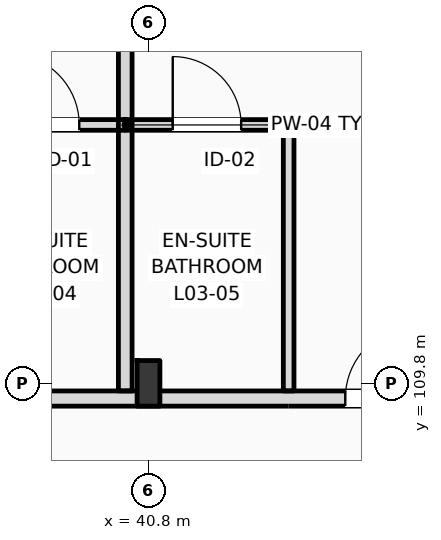
"""IFC4 building model, lengths in metres.
Left out: names, types, materials, properties, quantities, classifications, styles, units other than length and angle.
Written with IfcOpenShell. Run it as: python <this file> out.ifc"""

import sys

from ifc_helpers import new_model, si_unit, direction, frame, frame_2d, origin, origin_2d, place, context, subcontext, project, spatial, rectangle, i_section, extrude, element, fill, save


model = new_model("IFC4")
c1 = context("Model", 3, precision=1e-05, world=origin(), true_north=direction((0.0, 1.0)))
c2 = subcontext(c1, "Body", "Model", "MODEL_VIEW")
j1 = project(units=[si_unit("LENGTHUNIT", "METRE"), si_unit("PLANEANGLEUNIT", "RADIAN")], contexts=[c1])
p1 = place(None, origin())
s1 = spatial("IfcSite", under=j1, at=p1, CompositionType="ELEMENT")
p2 = place(p1, origin())
s2 = spatial("IfcBuilding", under=s1, at=p2, CompositionType="ELEMENT")
p3 = place(p2, frame((0.0, 0.0, 16.2)))
s3 = spatial("IfcBuildingStorey", under=s2, at=p3, CompositionType="ELEMENT", Elevation=16.2)
p4 = place(p3, frame((40.8, 109.8, 0.0), z_axis=(0.0, 0.0, 1.0), x_axis=(1.0, 0.0, 0.0)))
e1 = element("IfcColumn", 1, at=p4, inside=s3, PredefinedType="COLUMN", context=c2, shape_type="SweptSolid", body=[
    extrude(i_section(OverallWidth=0.3, OverallDepth=0.6, WebThickness=0.015, FlangeThickness=0.03, FilletRadius=0.027, at=origin_2d()), origin(), (0.0, 0.0, 1.0), 4.2),
])
p5 = place(p3, frame((10.65, 109.6, 0.0), z_axis=(0.0, 0.0, 1.0), x_axis=(1.0, 0.0, 0.0)))
e2 = element("IfcWall", 2, at=p5, inside=s3, PredefinedType="PARTITIONING", context=c2, shape_type="SweptSolid", body=[
    extrude(rectangle(XDim=109.21, YDim=0.2, at=frame_2d((54.605, 0.0))), origin(), (0.0, 0.0, 1.0), 3.36),
])
p6 = place(p5, frame((15.43, 0.0, 0.0)))
e3 = element("IfcOpeningElement", 3, at=p6, cuts=e2, PredefinedType="OPENING", context=c2, shape_type="SweptSolid", body=[
    extrude(rectangle(XDim=1.02, YDim=2.2, at=frame_2d((0.51, 1.1))), frame((0.0, 0.11, 0.0), z_axis=(0.0, -1.0, 0.0), x_axis=(1.0, 0.0, 0.0)), (0.0, 0.0, 1.0), 0.22),
])
p7 = place(p5, frame((19.537, 0.0, 0.0)))
e4 = element("IfcOpeningElement", 4, at=p7, cuts=e2, PredefinedType="OPENING", context=c2, shape_type="SweptSolid", body=[
    extrude(rectangle(XDim=1.02, YDim=2.2, at=frame_2d((0.51, 1.1))), frame((0.0, 0.11, 0.0), z_axis=(0.0, -1.0, 0.0), x_axis=(1.0, 0.0, 0.0)), (0.0, 0.0, 1.0), 0.22),
])
p8 = place(p5, frame((23.928, 0.0, 0.0)))
e5 = element("IfcOpeningElement", 5, at=p8, cuts=e2, PredefinedType="OPENING", context=c2, shape_type="SweptSolid", body=[
    extrude(rectangle(XDim=1.02, YDim=2.2, at=frame_2d((0.51, 1.1))), frame((0.0, 0.11, 0.0), z_axis=(0.0, -1.0, 0.0), x_axis=(1.0, 0.0, 0.0)), (0.0, 0.0, 1.0), 0.22),
])
p9 = place(p5, frame((26.169, 0.0, 0.0)))
e6 = element("IfcOpeningElement", 6, at=p9, cuts=e2, PredefinedType="OPENING", context=c2, shape_type="SweptSolid", body=[
    extrude(rectangle(XDim=1.02, YDim=2.2, at=frame_2d((0.51, 1.1))), frame((0.0, 0.11, 0.0), z_axis=(0.0, -1.0, 0.0), x_axis=(1.0, 0.0, 0.0)), (0.0, 0.0, 1.0), 0.22),
])
p10 = place(p5, frame((32.739, 0.0, 0.0)))
e7 = element("IfcOpeningElement", 7, at=p10, cuts=e2, PredefinedType="OPENING", context=c2, shape_type="SweptSolid", body=[
    extrude(rectangle(XDim=0.96, YDim=2.2, at=frame_2d((0.48, 1.1))), frame((0.0, 0.11, 0.0), z_axis=(0.0, -1.0, 0.0), x_axis=(1.0, 0.0, 0.0)), (0.0, 0.0, 1.0), 0.22),
])
p11 = place(p5, frame((34.98, 0.0, 0.0)))
e8 = element("IfcOpeningElement", 8, at=p11, cuts=e2, PredefinedType="OPENING", context=c2, shape_type="SweptSolid", body=[
    extrude(rectangle(XDim=0.96, YDim=2.2, at=frame_2d((0.48, 1.1))), frame((0.0, 0.11, 0.0), z_axis=(0.0, -1.0, 0.0), x_axis=(1.0, 0.0, 0.0)), (0.0, 0.0, 1.0), 0.22),
])
p12 = place(p5, frame((41.521, 0.0, 0.0)))
e9 = element("IfcOpeningElement", 9, at=p12, cuts=e2, PredefinedType="OPENING", context=c2, shape_type="SweptSolid", body=[
    extrude(rectangle(XDim=0.96, YDim=2.2, at=frame_2d((0.48, 1.1))), frame((0.0, 0.11, 0.0), z_axis=(0.0, -1.0, 0.0), x_axis=(1.0, 0.0, 0.0)), (0.0, 0.0, 1.0), 0.22),
])
p13 = place(p5, frame((43.512, 0.0, 0.0)))
e10 = element("IfcOpeningElement", 10, at=p13, cuts=e2, PredefinedType="OPENING", context=c2, shape_type="SweptSolid", body=[
    extrude(rectangle(XDim=0.96, YDim=2.2, at=frame_2d((0.48, 1.1))), frame((0.0, 0.11, 0.0), z_axis=(0.0, -1.0, 0.0), x_axis=(1.0, 0.0, 0.0)), (0.0, 0.0, 1.0), 0.22),
])
p14 = place(p5, frame((50.303, 0.0, 0.0)))
e11 = element("IfcOpeningElement", 11, at=p14, cuts=e2, PredefinedType="OPENING", context=c2, shape_type="SweptSolid", body=[
    extrude(rectangle(XDim=0.96, YDim=2.2, at=frame_2d((0.48, 1.1))), frame((0.0, 0.11, 0.0), z_axis=(0.0, -1.0, 0.0), x_axis=(1.0, 0.0, 0.0)), (0.0, 0.0, 1.0), 0.22),
])
p15 = place(p5, frame((54.944, 0.0, 0.0)))
e12 = element("IfcOpeningElement", 12, at=p15, cuts=e2, PredefinedType="OPENING", context=c2, shape_type="SweptSolid", body=[
    extrude(rectangle(XDim=0.96, YDim=2.2, at=frame_2d((0.48, 1.1))), frame((0.0, 0.11, 0.0), z_axis=(0.0, -1.0, 0.0), x_axis=(1.0, 0.0, 0.0)), (0.0, 0.0, 1.0), 0.22),
])
p16 = place(p5, frame((59.085, 0.0, 0.0)))
e13 = element("IfcOpeningElement", 13, at=p16, cuts=e2, PredefinedType="OPENING", context=c2, shape_type="SweptSolid", body=[
    extrude(rectangle(XDim=0.96, YDim=2.2, at=frame_2d((0.48, 1.1))), frame((0.0, 0.11, 0.0), z_axis=(0.0, -1.0, 0.0), x_axis=(1.0, 0.0, 0.0)), (0.0, 0.0, 1.0), 0.22),
])
p17 = place(p5, frame((63.476, 0.0, 0.0)))
e14 = element("IfcOpeningElement", 14, at=p17, cuts=e2, PredefinedType="OPENING", context=c2, shape_type="SweptSolid", body=[
    extrude(rectangle(XDim=0.96, YDim=2.2, at=frame_2d((0.48, 1.1))), frame((0.0, 0.11, 0.0), z_axis=(0.0, -1.0, 0.0), x_axis=(1.0, 0.0, 0.0)), (0.0, 0.0, 1.0), 0.22),
])
p18 = place(p5, frame((65.716, 0.0, 0.0)))
e15 = element("IfcOpeningElement", 15, at=p18, cuts=e2, PredefinedType="OPENING", context=c2, shape_type="SweptSolid", body=[
    extrude(rectangle(XDim=0.96, YDim=2.2, at=frame_2d((0.48, 1.1))), frame((0.0, 0.11, 0.0), z_axis=(0.0, -1.0, 0.0), x_axis=(1.0, 0.0, 0.0)), (0.0, 0.0, 1.0), 0.22),
])
p19 = place(p5, frame((72.257, 0.0, 0.0)))
e16 = element("IfcOpeningElement", 16, at=p19, cuts=e2, PredefinedType="OPENING", context=c2, shape_type="SweptSolid", body=[
    extrude(rectangle(XDim=0.96, YDim=2.2, at=frame_2d((0.48, 1.1))), frame((0.0, 0.11, 0.0), z_axis=(0.0, -1.0, 0.0), x_axis=(1.0, 0.0, 0.0)), (0.0, 0.0, 1.0), 0.22),
])
p20 = place(p5, frame((74.498, 0.0, 0.0)))
e17 = element("IfcOpeningElement", 17, at=p20, cuts=e2, PredefinedType="OPENING", context=c2, shape_type="SweptSolid", body=[
    extrude(rectangle(XDim=0.96, YDim=2.2, at=frame_2d((0.48, 1.1))), frame((0.0, 0.11, 0.0), z_axis=(0.0, -1.0, 0.0), x_axis=(1.0, 0.0, 0.0)), (0.0, 0.0, 1.0), 0.22),
])
p21 = place(p5, frame((81.039, 0.0, 0.0)))
e18 = element("IfcOpeningElement", 18, at=p21, cuts=e2, PredefinedType="OPENING", context=c2, shape_type="SweptSolid", body=[
    extrude(rectangle(XDim=0.96, YDim=2.2, at=frame_2d((0.48, 1.1))), frame((0.0, 0.11, 0.0), z_axis=(0.0, -1.0, 0.0), x_axis=(1.0, 0.0, 0.0)), (0.0, 0.0, 1.0), 0.22),
])
p22 = place(p5, frame((85.68, 0.0, 0.0)))
e19 = element("IfcOpeningElement", 19, at=p22, cuts=e2, PredefinedType="OPENING", context=c2, shape_type="SweptSolid", body=[
    extrude(rectangle(XDim=0.96, YDim=2.2, at=frame_2d((0.48, 1.1))), frame((0.0, 0.11, 0.0), z_axis=(0.0, -1.0, 0.0), x_axis=(1.0, 0.0, 0.0)), (0.0, 0.0, 1.0), 0.22),
])
p23 = place(p5, frame((89.82, 0.0, 0.0)))
e20 = element("IfcOpeningElement", 20, at=p23, cuts=e2, PredefinedType="OPENING", context=c2, shape_type="SweptSolid", body=[
    extrude(rectangle(XDim=0.96, YDim=2.2, at=frame_2d((0.48, 1.1))), frame((0.0, 0.11, 0.0), z_axis=(0.0, -1.0, 0.0), x_axis=(1.0, 0.0, 0.0)), (0.0, 0.0, 1.0), 0.22),
])
p24 = place(p5, frame((94.211, 0.0, 0.0)))
e21 = element("IfcOpeningElement", 21, at=p24, cuts=e2, PredefinedType="OPENING", context=c2, shape_type="SweptSolid", body=[
    extrude(rectangle(XDim=0.96, YDim=2.2, at=frame_2d((0.48, 1.1))), frame((0.0, 0.11, 0.0), z_axis=(0.0, -1.0, 0.0), x_axis=(1.0, 0.0, 0.0)), (0.0, 0.0, 1.0), 0.22),
])
p25 = place(p5, frame((98.602, 0.0, 0.0)))
e22 = element("IfcOpeningElement", 22, at=p25, cuts=e2, PredefinedType="OPENING", context=c2, shape_type="SweptSolid", body=[
    extrude(rectangle(XDim=0.96, YDim=2.2, at=frame_2d((0.48, 1.1))), frame((0.0, 0.11, 0.0), z_axis=(0.0, -1.0, 0.0), x_axis=(1.0, 0.0, 0.0)), (0.0, 0.0, 1.0), 0.22),
])
p26 = place(p5, frame((102.993, 0.0, 0.0)))
e23 = element("IfcOpeningElement", 23, at=p26, cuts=e2, PredefinedType="OPENING", context=c2, shape_type="SweptSolid", body=[
    extrude(rectangle(XDim=0.96, YDim=2.2, at=frame_2d((0.48, 1.1))), frame((0.0, 0.11, 0.0), z_axis=(0.0, -1.0, 0.0), x_axis=(1.0, 0.0, 0.0)), (0.0, 0.0, 1.0), 0.22),
])
p27 = place(p5, frame((105.269, 0.0, 0.0)))
e24 = element("IfcOpeningElement", 24, at=p27, cuts=e2, PredefinedType="OPENING", context=c2, shape_type="SweptSolid", body=[
    extrude(rectangle(XDim=0.96, YDim=2.2, at=frame_2d((0.48, 1.1))), frame((0.0, 0.11, 0.0), z_axis=(0.0, -1.0, 0.0), x_axis=(1.0, 0.0, 0.0)), (0.0, 0.0, 1.0), 0.22),
])
p28 = place(p5, frame((2.716, 0.0, 0.0)))
e25 = element("IfcOpeningElement", 25, at=p28, cuts=e2, PredefinedType="OPENING", context=c2, shape_type="SweptSolid", body=[
    extrude(rectangle(XDim=1.35, YDim=2.25, at=frame_2d((0.675, 1.125))), frame((0.0, 0.11, 0.0), z_axis=(0.0, -1.0, 0.0), x_axis=(1.0, 0.0, 0.0)), (0.0, 0.0, 1.0), 0.22),
])
p29 = place(p5, frame((6.65, 0.0, 0.0)))
e26 = element("IfcOpeningElement", 26, at=p29, cuts=e2, PredefinedType="OPENING", context=c2, shape_type="SweptSolid", body=[
    extrude(rectangle(XDim=1.35, YDim=2.25, at=frame_2d((0.675, 1.125))), frame((0.0, 0.11, 0.0), z_axis=(0.0, -1.0, 0.0), x_axis=(1.0, 0.0, 0.0)), (0.0, 0.0, 1.0), 0.22),
])
p30 = place(p5, frame((10.583, 0.0, 0.0)))
e27 = element("IfcOpeningElement", 27, at=p30, cuts=e2, PredefinedType="OPENING", context=c2, shape_type="SweptSolid", body=[
    extrude(rectangle(XDim=1.35, YDim=2.25, at=frame_2d((0.675, 1.125))), frame((0.0, 0.11, 0.0), z_axis=(0.0, -1.0, 0.0), x_axis=(1.0, 0.0, 0.0)), (0.0, 0.0, 1.0), 0.22),
])
p31 = place(p3, frame((40.494, 109.7, 0.0), z_axis=(0.0, 0.0, 1.0), x_axis=(0.0, 1.0, 0.0)))
e28 = element("IfcWall", 28, at=p31, inside=s3, PredefinedType="PARTITIONING", context=c2, shape_type="SweptSolid", body=[
    extrude(rectangle(XDim=8.15, YDim=0.18, at=frame_2d((4.075, 0.0))), origin(), (0.0, 0.0, 1.0), 3.92),
])
p32 = place(p3, frame((38.344, 113.2, 0.0), z_axis=(0.0, 0.0, 1.0), x_axis=(1.0, 0.0, 0.0)))
e29 = element("IfcWall", 29, at=p32, inside=s3, PredefinedType="PARTITIONING", context=c2, shape_type="SweptSolid", body=[
    extrude(rectangle(XDim=2.15, YDim=0.14, at=frame_2d((1.075, 0.0))), origin(), (0.0, 0.0, 1.0), 3.92),
])
p33 = place(p32, frame((0.605, 0.0, 0.0)))
e30 = element("IfcOpeningElement", 30, at=p33, cuts=e29, PredefinedType="OPENING", context=c2, shape_type="SweptSolid", body=[
    extrude(rectangle(XDim=0.94, YDim=2.15, at=frame_2d((0.47, 1.075))), frame((0.0, 0.08, 0.0), z_axis=(0.0, -1.0, 0.0), x_axis=(1.0, 0.0, 0.0)), (0.0, 0.0, 1.0), 0.16),
])
p34 = place(p3, frame((42.644, 109.7, 0.0), z_axis=(0.0, 0.0, 1.0), x_axis=(0.0, 1.0, 0.0)))
e31 = element("IfcWall", 31, at=p34, inside=s3, PredefinedType="PARTITIONING", context=c2, shape_type="SweptSolid", body=[
    extrude(rectangle(XDim=3.5, YDim=0.14, at=frame_2d((1.75, 0.0))), origin(), (0.0, 0.0, 1.0), 3.92),
])
p35 = place(p3, frame((40.494, 113.2, 0.0), z_axis=(0.0, 0.0, 1.0), x_axis=(1.0, 0.0, 0.0)))
e32 = element("IfcWall", 32, at=p35, inside=s3, PredefinedType="PARTITIONING", context=c2, shape_type="SweptSolid", body=[
    extrude(rectangle(XDim=2.15, YDim=0.14, at=frame_2d((1.075, 0.0))), origin(), (0.0, 0.0, 1.0), 3.92),
])
p36 = place(p35, frame((0.625, 0.0, 0.0)))
e33 = element("IfcOpeningElement", 33, at=p36, cuts=e32, PredefinedType="OPENING", context=c2, shape_type="SweptSolid", body=[
    extrude(rectangle(XDim=0.9, YDim=2.1, at=frame_2d((0.45, 1.05))), frame((0.0, 0.08, 0.0), z_axis=(0.0, -1.0, 0.0), x_axis=(1.0, 0.0, 0.0)), (0.0, 0.0, 1.0), 0.16),
])
p37 = place(p33, origin())
e34 = element("IfcDoor", 34, at=p37, inside=s3, OperationType="SINGLE_SWING_LEFT", PredefinedType="DOOR", context=c2, shape_type="SweptSolid", body=[
    extrude(rectangle(XDim=0.94, YDim=2.15, at=frame_2d((0.47, 1.075))), frame((0.0, 0.025, 0.0), z_axis=(0.0, -1.0, 0.0), x_axis=(1.0, 0.0, 0.0)), (0.0, 0.0, 1.0), 0.05),
])
fill(e30, e34)
p38 = place(p10, origin())
e35 = element("IfcDoor", 35, at=p38, inside=s3, OperationType="SINGLE_SWING_RIGHT", PredefinedType="DOOR", context=c2, shape_type="SweptSolid", body=[
    extrude(rectangle(XDim=0.96, YDim=2.2, at=frame_2d((0.48, 1.1))), frame((0.0, 0.025, 0.0), z_axis=(0.0, -1.0, 0.0), x_axis=(1.0, 0.0, 0.0)), (0.0, 0.0, 1.0), 0.05),
])
fill(e7, e35)
p39 = place(p36, origin())
e36 = element("IfcDoor", 36, at=p39, inside=s3, OperationType="SINGLE_SWING_LEFT", PredefinedType="DOOR", context=c2, shape_type="SweptSolid", body=[
    extrude(rectangle(XDim=0.9, YDim=2.1, at=frame_2d((0.45, 1.05))), frame((0.0, 0.025, 0.0), z_axis=(0.0, -1.0, 0.0), x_axis=(1.0, 0.0, 0.0)), (0.0, 0.0, 1.0), 0.05),
])
fill(e33, e36)
save(model, sys.argv[1])
